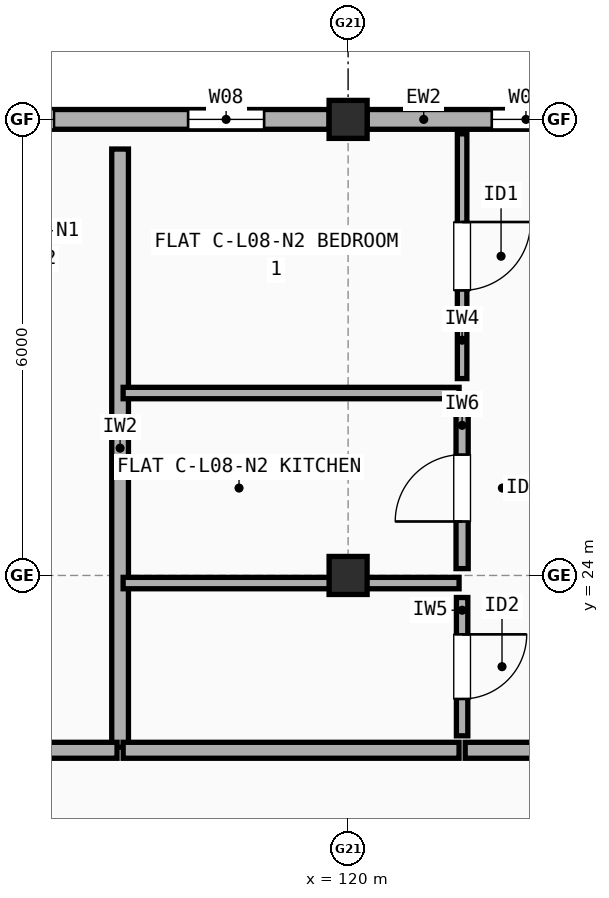
"""IFC4 building model, lengths in metres.
Left out: names, types, materials, properties, quantities, classifications, styles, units other than length and angle.
Written with IfcOpenShell. Run it as: python <this file> out.ifc"""

import sys

from ifc_helpers import new_model, si_unit, direction, frame, frame_2d, origin, origin_2d, place, context, subcontext, project, spatial, rectangle, extrude, element, fill, save


model = new_model("IFC4")
c1 = context("Model", 3, precision=1e-05, world=origin(), true_north=direction((0.0, 1.0)))
c2 = subcontext(c1, "Body", "Model", "MODEL_VIEW")
j1 = project(units=[si_unit("LENGTHUNIT", "METRE"), si_unit("PLANEANGLEUNIT", "RADIAN")], contexts=[c1])
p1 = place(None, origin())
s1 = spatial("IfcSite", under=j1, at=p1, CompositionType="ELEMENT")
p2 = place(p1, origin())
s2 = spatial("IfcBuilding", under=s1, at=p2, CompositionType="ELEMENT")
p3 = place(p2, frame((0.0, 0.0, 26.9)))
s3 = spatial("IfcBuildingStorey", under=s2, at=p3, CompositionType="ELEMENT", Elevation=26.9)
for number, where, z_axis, x_axis in (
    (1, (120.0, 24.0, 0.0), (0.0, 0.0, 1.0), (1.0, 0.0, 0.0)),
    (2, (120.0, 30.0, 0.0), (0.0, 0.0, 1.0), (1.0, 0.0, 0.0)),
):
    element("IfcColumn", number, at=place(p3, frame(where, z_axis=z_axis, x_axis=x_axis)), inside=s3, PredefinedType="COLUMN", context=c2, shape_type="SweptSolid", body=[
        extrude(rectangle(XDim=0.5, YDim=0.5, at=origin_2d()), origin(), (0.0, 0.0, 1.0), 2.98),
    ])
p4 = place(p3, frame((125.75, 30.0, 0.0), z_axis=(0.0, 0.0, 1.0), x_axis=(-1.0, 0.0, 0.0)))
e3 = element("IfcWall", 3, at=p4, inside=s3, PredefinedType="STANDARD", context=c2, shape_type="SweptSolid", body=[
    extrude(rectangle(XDim=5.5, YDim=0.26, at=frame_2d((2.75, 0.0))), origin(), (0.0, 0.0, 1.0), 2.462),
])
p5 = place(p4, frame((0.35, 0.0, 0.9)))
e4 = element("IfcOpeningElement", 4, at=p5, cuts=e3, PredefinedType="OPENING", context=c2, shape_type="SweptSolid", body=[
    extrude(rectangle(XDim=0.9, YDim=1.4, at=frame_2d((0.45, 0.7))), frame((0.0, 0.14, 0.0), z_axis=(0.0, -1.0, 0.0), x_axis=(1.0, 0.0, 0.0)), (0.0, 0.0, 1.0), 0.28),
])
p6 = place(p4, frame((2.96, 0.0, 0.9)))
e5 = element("IfcOpeningElement", 5, at=p6, cuts=e3, PredefinedType="OPENING", context=c2, shape_type="SweptSolid", body=[
    extrude(rectangle(XDim=0.9, YDim=1.4, at=frame_2d((0.45, 0.7))), frame((0.0, 0.14, 0.0), z_axis=(0.0, -1.0, 0.0), x_axis=(1.0, 0.0, 0.0)), (0.0, 0.0, 1.0), 0.28),
])
p7 = place(p3, frame((119.75, 30.0, 0.0), z_axis=(0.0, 0.0, 1.0), x_axis=(-1.0, 0.0, 0.0)))
e6 = element("IfcWall", 6, at=p7, inside=s3, PredefinedType="STANDARD", context=c2, shape_type="SweptSolid", body=[
    extrude(rectangle(XDim=5.5, YDim=0.26, at=frame_2d((2.75, 0.0))), origin(), (0.0, 0.0, 1.0), 2.462),
])
p8 = place(p7, frame((0.855, 0.0, 0.9)))
e7 = element("IfcOpeningElement", 7, at=p8, cuts=e6, PredefinedType="OPENING", context=c2, shape_type="SweptSolid", body=[
    extrude(rectangle(XDim=1.0, YDim=1.4, at=frame_2d((0.5, 0.7))), frame((0.0, 0.14, 0.0), z_axis=(0.0, -1.0, 0.0), x_axis=(1.0, 0.0, 0.0)), (0.0, 0.0, 1.0), 0.28),
])
p9 = place(p7, frame((3.62, 0.0, 0.9)))
e8 = element("IfcOpeningElement", 8, at=p9, cuts=e6, PredefinedType="OPENING", context=c2, shape_type="SweptSolid", body=[
    extrude(rectangle(XDim=1.05, YDim=1.35, at=frame_2d((0.525, 0.675))), frame((0.0, 0.14, 0.0), z_axis=(0.0, -1.0, 0.0), x_axis=(1.0, 0.0, 0.0)), (0.0, 0.0, 1.0), 0.28),
])
p10 = place(p3, frame((117.0, 21.74, 0.0), z_axis=(0.0, 0.0, 1.0), x_axis=(0.0, 1.0, 0.0)))
e9 = element("IfcWall", 9, at=p10, inside=s3, PredefinedType="SOLIDWALL", context=c2, shape_type="SweptSolid", body=[
    extrude(rectangle(XDim=7.87, YDim=0.22, at=frame_2d((3.935, 0.0))), origin(), (0.0, 0.0, 1.0), 2.548),
])
p11 = place(p3, frame((114.04, 21.7, 0.0), z_axis=(0.0, 0.0, 1.0), x_axis=(1.0, 0.0, 0.0)))
e10 = element("IfcWall", 10, at=p11, inside=s3, PredefinedType="SOLIDWALL", context=c2, shape_type="SweptSolid", body=[
    extrude(rectangle(XDim=2.92, YDim=0.21, at=frame_2d((1.46, 0.0))), origin(), (0.0, 0.0, 1.0), 2.508),
])
p12 = place(p3, frame((117.04, 21.7, 0.0), z_axis=(0.0, 0.0, 1.0), x_axis=(1.0, 0.0, 0.0)))
e11 = element("IfcWall", 11, at=p12, inside=s3, PredefinedType="SOLIDWALL", context=c2, shape_type="SweptSolid", body=[
    extrude(rectangle(XDim=4.42, YDim=0.21, at=frame_2d((2.21, 0.0))), origin(), (0.0, 0.0, 1.0), 2.98),
])
p13 = place(p3, frame((121.54, 21.7, 0.0), z_axis=(0.0, 0.0, 1.0), x_axis=(1.0, 0.0, 0.0)))
e12 = element("IfcWall", 12, at=p13, inside=s3, PredefinedType="SOLIDWALL", context=c2, shape_type="SweptSolid", body=[
    extrude(rectangle(XDim=7.42, YDim=0.21, at=frame_2d((3.71, 0.0))), origin(), (0.0, 0.0, 1.0), 2.98),
])
p14 = place(p13, frame((3.22, 0.0, 0.0)))
e13 = element("IfcOpeningElement", 13, at=p14, cuts=e12, PredefinedType="OPENING", context=c2, shape_type="SweptSolid", body=[
    extrude(rectangle(XDim=0.98, YDim=2.15, at=frame_2d((0.49, 1.075))), frame((0.0, 0.115, 0.0), z_axis=(0.0, -1.0, 0.0), x_axis=(1.0, 0.0, 0.0)), (0.0, 0.0, 1.0), 0.23),
])
p15 = place(p3, frame((121.5, 26.59, 0.0), z_axis=(0.0, 0.0, 1.0), x_axis=(0.0, 1.0, 0.0)))
e14 = element("IfcWall", 14, at=p15, inside=s3, PredefinedType="PARTITIONING", context=c2, shape_type="SweptSolid", body=[
    extrude(rectangle(XDim=3.22, YDim=0.125, at=frame_2d((1.61, 0.0))), origin(), (0.0, 0.0, 1.0), 2.98),
])
p16 = place(p15, frame((1.16, 0.0, 0.0)))
e15 = element("IfcOpeningElement", 15, at=p16, cuts=e14, PredefinedType="OPENING", context=c2, shape_type="SweptSolid", body=[
    extrude(rectangle(XDim=0.9, YDim=2.1, at=frame_2d((0.45, 1.05))), frame((0.0, 0.073, 0.0), z_axis=(0.0, -1.0, 0.0), x_axis=(1.0, 0.0, 0.0)), (0.0, 0.0, 1.0), 0.145),
])
p17 = place(p3, frame((121.5, 24.09, 0.0), z_axis=(0.0, 0.0, 1.0), x_axis=(0.0, 1.0, 0.0)))
e16 = element("IfcWall", 16, at=p17, inside=s3, PredefinedType="PLUMBINGWALL", context=c2, shape_type="SweptSolid", body=[
    extrude(rectangle(XDim=2.12, YDim=0.16, at=frame_2d((1.06, 0.0))), origin(), (0.0, 0.0, 1.0), 2.98),
])
p18 = place(p17, frame((0.62, 0.0, 0.0)))
e17 = element("IfcOpeningElement", 17, at=p18, cuts=e16, PredefinedType="OPENING", context=c2, shape_type="SweptSolid", body=[
    extrude(rectangle(XDim=0.88, YDim=2.1, at=frame_2d((0.44, 1.05))), frame((0.0, 0.09, 0.0), z_axis=(0.0, -1.0, 0.0), x_axis=(1.0, 0.0, 0.0)), (0.0, 0.0, 1.0), 0.18),
])
p19 = place(p3, frame((121.5, 21.89, 0.0), z_axis=(0.0, 0.0, 1.0), x_axis=(0.0, 1.0, 0.0)))
e18 = element("IfcWall", 18, at=p19, inside=s3, PredefinedType="PARTITIONING", context=c2, shape_type="SweptSolid", body=[
    extrude(rectangle(XDim=1.82, YDim=0.15, at=frame_2d((0.91, 0.0))), origin(), (0.0, 0.0, 1.0), 2.98),
])
p20 = place(p19, frame((0.485, 0.0, 0.0)))
e19 = element("IfcOpeningElement", 19, at=p20, cuts=e18, PredefinedType="OPENING", context=c2, shape_type="SweptSolid", body=[
    extrude(rectangle(XDim=0.85, YDim=2.1, at=frame_2d((0.425, 1.05))), frame((0.0, 0.085, 0.0), z_axis=(0.0, -1.0, 0.0), x_axis=(1.0, 0.0, 0.0)), (0.0, 0.0, 1.0), 0.17),
])
p21 = place(p3, frame((117.04, 26.4, 0.0), z_axis=(0.0, 0.0, 1.0), x_axis=(1.0, 0.0, 0.0)))
e20 = element("IfcWall", 20, at=p21, inside=s3, PredefinedType="PARTITIONING", context=c2, shape_type="SweptSolid", body=[
    extrude(rectangle(XDim=4.42, YDim=0.15, at=frame_2d((2.21, 0.0))), origin(), (0.0, 0.0, 1.0), 2.458),
])
p22 = place(p3, frame((117.04, 23.9, 0.0), z_axis=(0.0, 0.0, 1.0), x_axis=(1.0, 0.0, 0.0)))
e21 = element("IfcWall", 21, at=p22, inside=s3, PredefinedType="PARTITIONING", context=c2, shape_type="SweptSolid", body=[
    extrude(rectangle(XDim=4.42, YDim=0.15, at=frame_2d((2.21, 0.0))), origin(), (0.0, 0.0, 1.0), 2.508),
])
p23 = place(p6, origin())
e22 = element("IfcWindow", 22, at=p23, inside=s3, PartitioningType="SINGLE_PANEL", PredefinedType="WINDOW", context=c2, shape_type="SweptSolid", body=[
    extrude(rectangle(XDim=0.9, YDim=1.4, at=frame_2d((0.45, 0.7))), frame((0.0, 0.03, 0.0), z_axis=(0.0, -1.0, 0.0), x_axis=(1.0, 0.0, 0.0)), (0.0, 0.0, 1.0), 0.06),
])
fill(e5, e22)
p24 = place(p8, origin())
e23 = element("IfcWindow", 23, at=p24, inside=s3, PartitioningType="SINGLE_PANEL", PredefinedType="WINDOW", context=c2, shape_type="SweptSolid", body=[
    extrude(rectangle(XDim=1.0, YDim=1.4, at=frame_2d((0.5, 0.7))), frame((0.0, 0.03, 0.0), z_axis=(0.0, -1.0, 0.0), x_axis=(1.0, 0.0, 0.0)), (0.0, 0.0, 1.0), 0.06),
])
fill(e7, e23)
p25 = place(p9, origin())
e24 = element("IfcWindow", 24, at=p25, inside=s3, PartitioningType="SINGLE_PANEL", PredefinedType="WINDOW", context=c2, shape_type="SweptSolid", body=[
    extrude(rectangle(XDim=1.05, YDim=1.35, at=frame_2d((0.525, 0.675))), frame((0.0, 0.03, 0.0), z_axis=(0.0, -1.0, 0.0), x_axis=(1.0, 0.0, 0.0)), (0.0, 0.0, 1.0), 0.06),
])
fill(e8, e24)
p26 = place(p16, origin())
e25 = element("IfcDoor", 25, at=p26, inside=s3, OperationType="SINGLE_SWING_RIGHT", PredefinedType="DOOR", context=c2, shape_type="SweptSolid", body=[
    extrude(rectangle(XDim=0.9, YDim=2.1, at=frame_2d((0.45, 1.05))), frame((0.0, 0.025, 0.0), z_axis=(0.0, -1.0, 0.0), x_axis=(1.0, 0.0, 0.0)), (0.0, 0.0, 1.0), 0.05),
])
fill(e15, e25)
p27 = place(p18, origin())
e26 = element("IfcDoor", 26, at=p27, inside=s3, OperationType="SINGLE_SWING_LEFT", PredefinedType="DOOR", context=c2, shape_type="SweptSolid", body=[
    extrude(rectangle(XDim=0.88, YDim=2.1, at=frame_2d((0.44, 1.05))), frame((0.0, 0.025, 0.0), z_axis=(0.0, -1.0, 0.0), x_axis=(1.0, 0.0, 0.0)), (0.0, 0.0, 1.0), 0.05),
])
fill(e17, e26)
p28 = place(p20, origin())
e27 = element("IfcDoor", 27, at=p28, inside=s3, OperationType="SINGLE_SWING_RIGHT", PredefinedType="DOOR", context=c2, shape_type="SweptSolid", body=[
    extrude(rectangle(XDim=0.85, YDim=2.1, at=frame_2d((0.425, 1.05))), frame((0.0, 0.025, 0.0), z_axis=(0.0, -1.0, 0.0), x_axis=(1.0, 0.0, 0.0)), (0.0, 0.0, 1.0), 0.05),
])
fill(e19, e27)
save(model, sys.argv[1])
